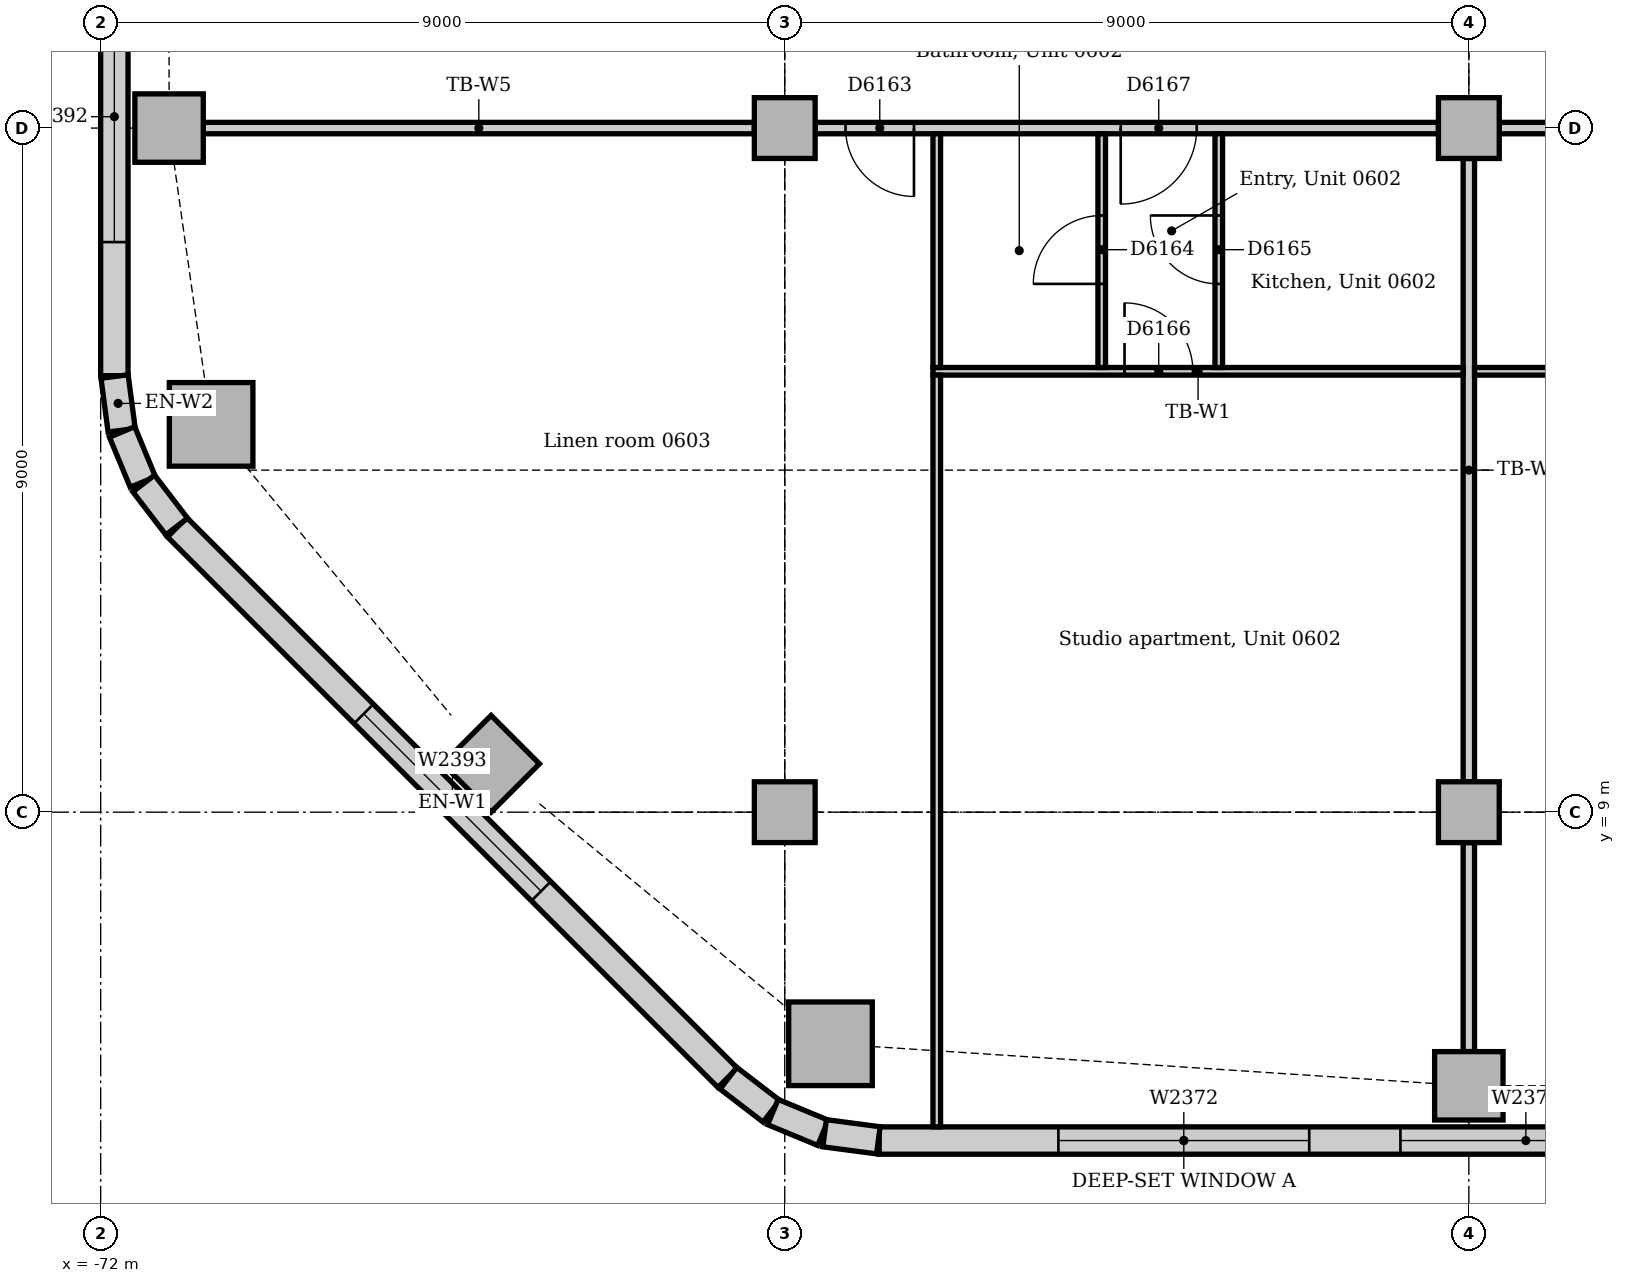
"""IFC4 building model, lengths in metres.
Left out: names, types, materials, properties, quantities, classifications, styles, units other than length and angle.
Written with IfcOpenShell. Run it as: python <this file> out.ifc"""

import sys

from ifc_helpers import new_model, si_unit, direction, frame, frame_2d, origin, origin_2d, place, context, subcontext, project, spatial, rectangle, extrude, element, fill, save


model = new_model("IFC4")
c1 = context("Model", 3, precision=1e-05, world=origin(), true_north=direction((0.0, 1.0)))
c2 = subcontext(c1, "Body", "Model", "MODEL_VIEW")
j1 = project(units=[si_unit("LENGTHUNIT", "METRE"), si_unit("PLANEANGLEUNIT", "RADIAN")], contexts=[c1])
p1 = place(None, origin())
s1 = spatial("IfcSite", under=j1, at=p1, CompositionType="ELEMENT")
p2 = place(p1, origin())
s2 = spatial("IfcBuilding", under=s1, at=p2, CompositionType="ELEMENT")
p3 = place(p2, frame((0.0, 0.0, 30.0)))
s3 = spatial("IfcBuildingStorey", under=s2, at=p3, CompositionType="ELEMENT", Elevation=30.0)
for number, where, z_axis, x_axis in (
    (1, (-62.398, 5.953, 0.0), (0.0, 0.0, 1.0), (1.0, 0.0, 0.0)),
    (2, (-70.547, 14.102, 0.0), (0.0, 0.0, 1.0), (1.0, 0.0, 0.0)),
):
    element("IfcColumn", number, at=place(p3, frame(where, z_axis=z_axis, x_axis=x_axis)), inside=s3, PredefinedType="COLUMN", context=c2, shape_type="SweptSolid", body=[
        extrude(rectangle(XDim=1.1, YDim=1.1, at=origin_2d()), origin(), (0.0, 0.0, 1.0), 3.85),
    ])
for number, where, z_axis, x_axis in (
    (3, (-54.0, 5.4, 0.0), (0.0, 0.0, 1.0), (1.0, 0.0, 0.0)),
    (4, (-71.1, 18.0, 0.0), (0.0, 0.0, 1.0), (1.0, 0.0, 0.0)),
    (5, (-66.864, 9.636, 0.0), (0.0, 0.0, 1.0), (0.707, 0.707, 0.0)),
):
    element("IfcColumn", number, at=place(p3, frame(where, z_axis=z_axis, x_axis=x_axis)), inside=s3, PredefinedType="COLUMN", context=c2, shape_type="SweptSolid", body=[
        extrude(rectangle(XDim=0.9, YDim=0.9, at=origin_2d()), origin(), (0.0, 0.0, 1.0), 3.85),
    ])
for number, where, z_axis, x_axis in (
    (6, (-63.0, 9.0, 0.0), (0.0, 0.0, 1.0), (1.0, 0.0, 0.0)),
    (7, (-63.0, 18.0, 0.0), (0.0, 0.0, 1.0), (1.0, 0.0, 0.0)),
    (8, (-54.0, 9.0, 0.0), (0.0, 0.0, 1.0), (1.0, 0.0, 0.0)),
    (9, (-54.0, 18.0, 0.0), (0.0, 0.0, 1.0), (1.0, 0.0, 0.0)),
):
    element("IfcColumn", number, at=place(p3, frame(where, z_axis=z_axis, x_axis=x_axis)), inside=s3, PredefinedType="COLUMN", context=c2, shape_type="SweptSolid", body=[
        extrude(rectangle(XDim=0.8, YDim=0.8, at=origin_2d()), origin(), (0.0, 0.0, 1.0), 3.85),
    ])
p4 = place(p3, frame((-61.757, 4.68, 0.0), z_axis=(0.0, 0.0, 1.0), x_axis=(1.0, 0.0, 0.0)))
e10 = element("IfcWall", 10, at=p4, inside=s3, PredefinedType="STANDARD", context=c2, shape_type="SweptSolid", body=[
    extrude(rectangle(XDim=30.515, YDim=0.36, at=frame_2d((15.257, 0.0))), origin(), (0.0, 0.0, 1.0), 3.85),
])
p5 = place(p4, frame((2.357, 0.0, 0.9)))
e11 = element("IfcOpeningElement", 11, at=p5, cuts=e10, PredefinedType="OPENING", context=c2, shape_type="SweptSolid", body=[
    extrude(rectangle(XDim=3.3, YDim=1.6, at=frame_2d((1.65, 0.8))), frame((0.0, 0.19, 0.0), z_axis=(0.0, -1.0, 0.0), x_axis=(1.0, 0.0, 0.0)), (0.0, 0.0, 1.0), 0.38),
])
p6 = place(p4, frame((6.857, 0.0, 0.9)))
e12 = element("IfcOpeningElement", 12, at=p6, cuts=e10, PredefinedType="OPENING", context=c2, shape_type="SweptSolid", body=[
    extrude(rectangle(XDim=3.3, YDim=1.6, at=frame_2d((1.65, 0.8))), frame((0.0, 0.19, 0.0), z_axis=(0.0, -1.0, 0.0), x_axis=(1.0, 0.0, 0.0)), (0.0, 0.0, 1.0), 0.38),
])
p7 = place(p4, frame((11.357, 0.0, 0.9)))
e13 = element("IfcOpeningElement", 13, at=p7, cuts=e10, PredefinedType="OPENING", context=c2, shape_type="SweptSolid", body=[
    extrude(rectangle(XDim=3.3, YDim=1.6, at=frame_2d((1.65, 0.8))), frame((0.0, 0.19, 0.0), z_axis=(0.0, -1.0, 0.0), x_axis=(1.0, 0.0, 0.0)), (0.0, 0.0, 1.0), 0.38),
])
p8 = place(p4, frame((15.857, 0.0, 0.9)))
e14 = element("IfcOpeningElement", 14, at=p8, cuts=e10, PredefinedType="OPENING", context=c2, shape_type="SweptSolid", body=[
    extrude(rectangle(XDim=3.3, YDim=1.6, at=frame_2d((1.65, 0.8))), frame((0.0, 0.19, 0.0), z_axis=(0.0, -1.0, 0.0), x_axis=(1.0, 0.0, 0.0)), (0.0, 0.0, 1.0), 0.38),
])
p9 = place(p4, frame((20.357, 0.0, 0.9)))
e15 = element("IfcOpeningElement", 15, at=p9, cuts=e10, PredefinedType="OPENING", context=c2, shape_type="SweptSolid", body=[
    extrude(rectangle(XDim=3.3, YDim=1.6, at=frame_2d((1.65, 0.8))), frame((0.0, 0.19, 0.0), z_axis=(0.0, -1.0, 0.0), x_axis=(1.0, 0.0, 0.0)), (0.0, 0.0, 1.0), 0.38),
])
p10 = place(p4, frame((24.857, 0.0, 0.9)))
e16 = element("IfcOpeningElement", 16, at=p10, cuts=e10, PredefinedType="OPENING", context=c2, shape_type="SweptSolid", body=[
    extrude(rectangle(XDim=3.3, YDim=1.6, at=frame_2d((1.65, 0.8))), frame((0.0, 0.19, 0.0), z_axis=(0.0, -1.0, 0.0), x_axis=(1.0, 0.0, 0.0)), (0.0, 0.0, 1.0), 0.38),
])
p11 = place(p3, frame((-71.82, 40.757, 0.0), z_axis=(0.0, 0.0, 1.0), x_axis=(0.0, -1.0, 0.0)))
e17 = element("IfcWall", 17, at=p11, inside=s3, PredefinedType="STANDARD", context=c2, shape_type="SweptSolid", body=[
    extrude(rectangle(XDim=26.015, YDim=0.36, at=frame_2d((13.007, 0.0))), origin(), (0.0, 0.0, 1.0), 3.85),
])
p12 = place(p11, frame((2.357, 0.0, 0.9)))
e18 = element("IfcOpeningElement", 18, at=p12, cuts=e17, PredefinedType="OPENING", context=c2, shape_type="SweptSolid", body=[
    extrude(rectangle(XDim=3.3, YDim=1.6, at=frame_2d((1.65, 0.8))), frame((0.0, 0.19, 0.0), z_axis=(0.0, -1.0, 0.0), x_axis=(1.0, 0.0, 0.0)), (0.0, 0.0, 1.0), 0.38),
])
p13 = place(p11, frame((7.057, 0.0, 0.9)))
e19 = element("IfcOpeningElement", 19, at=p13, cuts=e17, PredefinedType="OPENING", context=c2, shape_type="SweptSolid", body=[
    extrude(rectangle(XDim=3.3, YDim=1.6, at=frame_2d((1.65, 0.8))), frame((0.0, 0.19, 0.0), z_axis=(0.0, -1.0, 0.0), x_axis=(1.0, 0.0, 0.0)), (0.0, 0.0, 1.0), 0.38),
])
p14 = place(p11, frame((11.357, 0.0, 0.9)))
e20 = element("IfcOpeningElement", 20, at=p14, cuts=e17, PredefinedType="OPENING", context=c2, shape_type="SweptSolid", body=[
    extrude(rectangle(XDim=3.3, YDim=1.6, at=frame_2d((1.65, 0.8))), frame((0.0, 0.19, 0.0), z_axis=(0.0, -1.0, 0.0), x_axis=(1.0, 0.0, 0.0)), (0.0, 0.0, 1.0), 0.38),
])
p15 = place(p11, frame((15.857, 0.0, 0.9)))
e21 = element("IfcOpeningElement", 21, at=p15, cuts=e17, PredefinedType="OPENING", context=c2, shape_type="SweptSolid", body=[
    extrude(rectangle(XDim=3.3, YDim=1.6, at=frame_2d((1.65, 0.8))), frame((0.0, 0.19, 0.0), z_axis=(0.0, -1.0, 0.0), x_axis=(1.0, 0.0, 0.0)), (0.0, 0.0, 1.0), 0.38),
])
p16 = place(p11, frame((20.957, 0.0, 0.9)))
e22 = element("IfcOpeningElement", 22, at=p16, cuts=e17, PredefinedType="OPENING", context=c2, shape_type="SweptSolid", body=[
    extrude(rectangle(XDim=3.3, YDim=1.6, at=frame_2d((1.65, 0.8))), frame((0.0, 0.19, 0.0), z_axis=(0.0, -1.0, 0.0), x_axis=(1.0, 0.0, 0.0)), (0.0, 0.0, 1.0), 0.38),
])
p17 = place(p3, frame((-70.994, 12.749, 0.0), z_axis=(0.0, 0.0, 1.0), x_axis=(0.707106781187, -0.707106781187, 0.0)))
e23 = element("IfcWall", 23, at=p17, inside=s3, PredefinedType="STANDARD", context=c2, shape_type="SweptSolid", body=[
    extrude(rectangle(XDim=10.243, YDim=0.36, at=frame_2d((5.121, 0.0))), origin(), (0.0, 0.0, 1.0), 3.85),
])
p18 = place(p17, frame((3.471, 0.0, 0.9)))
e24 = element("IfcOpeningElement", 24, at=p18, cuts=e23, PredefinedType="OPENING", context=c2, shape_type="SweptSolid", body=[
    extrude(rectangle(XDim=3.3, YDim=1.6, at=frame_2d((1.65, 0.8))), frame((0.0, 0.19, 0.0), z_axis=(0.0, -1.0, 0.0), x_axis=(1.0, 0.0, 0.0)), (0.0, 0.0, 1.0), 0.38),
])
for number, where, z_axis, x_axis in (
    (25, (-71.817, 14.731, 0.0), (0.0, 0.0, 1.0), (0.131, -0.991, 0.0)),
    (26, (-71.718, 14.003, 0.0), (0.0, 0.0, 1.0), (0.383, -0.924, 0.0)),
):
    element("IfcWall", number, at=place(p3, frame(where, z_axis=z_axis, x_axis=x_axis)), inside=s3, PredefinedType="STANDARD", context=c2, shape_type="SweptSolid", body=[
        extrude(rectangle(XDim=0.713, YDim=0.36, at=frame_2d((0.356, 0.0))), origin(), (0.0, 0.0, 1.0), 3.85),
    ])
for number, where, z_axis, x_axis in (
    (27, (-71.434, 13.325, 0.0), (0.0, 0.0, 1.0), (0.609, -0.793, 0.0)),
    (28, (-63.741, 5.5, 0.0), (0.0, 0.0, 1.0), (0.793, -0.609, 0.0)),
):
    element("IfcWall", number, at=place(p3, frame(where, z_axis=z_axis, x_axis=x_axis)), inside=s3, PredefinedType="STANDARD", context=c2, shape_type="SweptSolid", body=[
        extrude(rectangle(XDim=0.713, YDim=0.36, at=frame_2d((0.357, 0.0))), origin(), (0.0, 0.0, 1.0), 3.85),
    ])
for number, where, z_axis, x_axis in (
    (29, (-63.156, 5.055, 0.0), (0.0, 0.0, 1.0), (0.924, -0.383, 0.0)),
    (30, (-62.476, 4.776, 0.0), (0.0, 0.0, 1.0), (0.991, -0.131, 0.0)),
):
    element("IfcWall", number, at=place(p3, frame(where, z_axis=z_axis, x_axis=x_axis)), inside=s3, PredefinedType="STANDARD", context=c2, shape_type="SweptSolid", body=[
        extrude(rectangle(XDim=0.713, YDim=0.36, at=frame_2d((0.356, 0.0))), origin(), (0.0, 0.0, 1.0), 3.85),
    ])
p19 = place(p3, frame((-53.6, 18.0, 0.0), z_axis=(0.0, 0.0, 1.0), x_axis=(1.0, 0.0, 0.0)))
e31 = element("IfcWall", 31, at=p19, inside=s3, PredefinedType="PARTITIONING", context=c2, shape_type="SweptSolid", body=[
    extrude(rectangle(XDim=8.2, YDim=0.15, at=frame_2d((4.1, 0.0))), origin(), (0.0, 0.0, 1.0), 3.15),
])
p20 = place(p19, frame((2.89, 0.0, 0.0)))
e32 = element("IfcOpeningElement", 32, at=p20, cuts=e31, PredefinedType="OPENING", context=c2, shape_type="SweptSolid", body=[
    extrude(rectangle(XDim=1.0, YDim=2.1, at=frame_2d((0.5, 1.05))), frame((0.0, 0.085, 0.0), z_axis=(0.0, -1.0, 0.0), x_axis=(1.0, 0.0, 0.0)), (0.0, 0.0, 1.0), 0.17),
])
p21 = place(p3, frame((-62.6, 18.0, 0.0), z_axis=(0.0, 0.0, 1.0), x_axis=(1.0, 0.0, 0.0)))
e33 = element("IfcWall", 33, at=p21, inside=s3, PredefinedType="PARTITIONING", context=c2, shape_type="SweptSolid", body=[
    extrude(rectangle(XDim=8.2, YDim=0.15, at=frame_2d((4.1, 0.0))), origin(), (0.0, 0.0, 1.0), 3.15),
])
p22 = place(p21, frame((0.4, 0.0, 0.0)))
e34 = element("IfcOpeningElement", 34, at=p22, cuts=e33, PredefinedType="OPENING", context=c2, shape_type="SweptSolid", body=[
    extrude(rectangle(XDim=0.9, YDim=2.1, at=frame_2d((0.45, 1.05))), frame((0.0, 0.085, 0.0), z_axis=(0.0, -1.0, 0.0), x_axis=(1.0, 0.0, 0.0)), (0.0, 0.0, 1.0), 0.17),
])
p23 = place(p21, frame((4.02, 0.0, 0.0)))
e35 = element("IfcOpeningElement", 35, at=p23, cuts=e33, PredefinedType="OPENING", context=c2, shape_type="SweptSolid", body=[
    extrude(rectangle(XDim=1.0, YDim=2.1, at=frame_2d((0.5, 1.05))), frame((0.0, 0.085, 0.0), z_axis=(0.0, -1.0, 0.0), x_axis=(1.0, 0.0, 0.0)), (0.0, 0.0, 1.0), 0.17),
])
p24 = place(p3, frame((-70.65, 18.0, 0.0), z_axis=(0.0, 0.0, 1.0), x_axis=(1.0, 0.0, 0.0)))
e36 = element("IfcWall", 36, at=p24, inside=s3, PredefinedType="PARTITIONING", context=c2, shape_type="SweptSolid", body=[
    extrude(rectangle(XDim=7.25, YDim=0.15, at=frame_2d((3.625, 0.0))), origin(), (0.0, 0.0, 1.0), 3.15),
])
p25 = place(p3, frame((-54.0, 9.4, 0.0), z_axis=(0.0, 0.0, 1.0), x_axis=(0.0, 1.0, 0.0)))
e37 = element("IfcWall", 37, at=p25, inside=s3, PredefinedType="PARTITIONING", context=c2, shape_type="SweptSolid", body=[
    extrude(rectangle(XDim=8.2, YDim=0.15, at=frame_2d((4.1, 0.0))), origin(), (0.0, 0.0, 1.0), 3.158),
])
p26 = place(p3, frame((-54.0, 5.85, 0.0), z_axis=(0.0, 0.0, 1.0), x_axis=(0.0, 1.0, 0.0)))
e38 = element("IfcWall", 38, at=p26, inside=s3, PredefinedType="PARTITIONING", context=c2, shape_type="SweptSolid", body=[
    extrude(rectangle(XDim=2.75, YDim=0.15, at=frame_2d((1.375, 0.0))), origin(), (0.0, 0.0, 1.0), 3.652),
])
p27 = place(p3, frame((-61.05, 14.8, 0.0), z_axis=(0.0, 0.0, 1.0), x_axis=(1.0, 0.0, 0.0)))
e39 = element("IfcWall", 39, at=p27, inside=s3, PredefinedType="PARTITIONING", context=c2, shape_type="SweptSolid", body=[
    extrude(rectangle(XDim=6.975, YDim=0.1, at=frame_2d((3.487, 0.0))), origin(), (0.0, 0.0, 1.0), 3.85),
])
p28 = place(p27, frame((2.52, 0.0, 0.0)))
e40 = element("IfcOpeningElement", 40, at=p28, cuts=e39, PredefinedType="OPENING", context=c2, shape_type="SweptSolid", body=[
    extrude(rectangle(XDim=0.9, YDim=2.1, at=frame_2d((0.45, 1.05))), frame((0.0, 0.06, 0.0), z_axis=(0.0, -1.0, 0.0), x_axis=(1.0, 0.0, 0.0)), (0.0, 0.0, 1.0), 0.12),
])
p29 = place(p3, frame((-53.925, 14.8, 0.0), z_axis=(0.0, 0.0, 1.0), x_axis=(1.0, 0.0, 0.0)))
e41 = element("IfcWall", 41, at=p29, inside=s3, PredefinedType="PARTITIONING", context=c2, shape_type="SweptSolid", body=[
    extrude(rectangle(XDim=8.85, YDim=0.1, at=frame_2d((4.425, 0.0))), origin(), (0.0, 0.0, 1.0), 3.85),
])
p30 = place(p29, frame((3.265, 0.0, 0.0)))
e42 = element("IfcOpeningElement", 42, at=p30, cuts=e41, PredefinedType="OPENING", context=c2, shape_type="SweptSolid", body=[
    extrude(rectangle(XDim=0.9, YDim=2.1, at=frame_2d((0.45, 1.05))), frame((0.0, 0.06, 0.0), z_axis=(0.0, -1.0, 0.0), x_axis=(1.0, 0.0, 0.0)), (0.0, 0.0, 1.0), 0.12),
])
p31 = place(p3, frame((-61.0, 14.85, 0.0), z_axis=(0.0, 0.0, 1.0), x_axis=(0.0, 1.0, 0.0)))
e43 = element("IfcWall", 43, at=p31, inside=s3, PredefinedType="PARTITIONING", context=c2, shape_type="SweptSolid", body=[
    extrude(rectangle(XDim=3.075, YDim=0.1, at=frame_2d((1.538, 0.0))), origin(), (0.0, 0.0, 1.0), 3.85),
])
p32 = place(p3, frame((-61.0, 4.86, 0.0), z_axis=(0.0, 0.0, 1.0), x_axis=(0.0, 1.0, 0.0)))
e44 = element("IfcWall", 44, at=p32, inside=s3, PredefinedType="PARTITIONING", context=c2, shape_type="SweptSolid", body=[
    extrude(rectangle(XDim=9.89, YDim=0.1, at=frame_2d((4.945, 0.0))), origin(), (0.0, 0.0, 1.0), 3.85),
])
p33 = place(p3, frame((-58.83, 14.85, 0.0), z_axis=(0.0, 0.0, 1.0), x_axis=(0.0, 1.0, 0.0)))
e45 = element("IfcWall", 45, at=p33, inside=s3, PredefinedType="PARTITIONING", context=c2, shape_type="SweptSolid", body=[
    extrude(rectangle(XDim=3.075, YDim=0.1, at=frame_2d((1.538, 0.0))), origin(), (0.0, 0.0, 1.0), 3.85),
])
p34 = place(p33, frame((1.1, 0.0, 0.0)))
e46 = element("IfcOpeningElement", 46, at=p34, cuts=e45, PredefinedType="OPENING", context=c2, shape_type="SweptSolid", body=[
    extrude(rectangle(XDim=0.9, YDim=2.1, at=frame_2d((0.45, 1.05))), frame((0.0, 0.06, 0.0), z_axis=(0.0, -1.0, 0.0), x_axis=(1.0, 0.0, 0.0)), (0.0, 0.0, 1.0), 0.12),
])
p35 = place(p3, frame((-57.29, 14.85, 0.0), z_axis=(0.0, 0.0, 1.0), x_axis=(0.0, 1.0, 0.0)))
e47 = element("IfcWall", 47, at=p35, inside=s3, PredefinedType="PARTITIONING", context=c2, shape_type="SweptSolid", body=[
    extrude(rectangle(XDim=3.075, YDim=0.1, at=frame_2d((1.538, 0.0))), origin(), (0.0, 0.0, 1.0), 3.85),
])
p36 = place(p35, frame((1.1, 0.0, 0.0)))
e48 = element("IfcOpeningElement", 48, at=p36, cuts=e47, PredefinedType="OPENING", context=c2, shape_type="SweptSolid", body=[
    extrude(rectangle(XDim=0.9, YDim=2.1, at=frame_2d((0.45, 1.05))), frame((0.0, 0.06, 0.0), z_axis=(0.0, -1.0, 0.0), x_axis=(1.0, 0.0, 0.0)), (0.0, 0.0, 1.0), 0.12),
])
p37 = place(p5, origin())
e49 = element("IfcWindow", 49, at=p37, inside=s3, PartitioningType="SINGLE_PANEL", PredefinedType="WINDOW", context=c2, shape_type="SweptSolid", body=[
    extrude(rectangle(XDim=3.3, YDim=1.6, at=frame_2d((1.65, 0.8))), frame((0.0, 0.13, 0.0), z_axis=(0.0, -1.0, 0.0), x_axis=(1.0, 0.0, 0.0)), (0.0, 0.0, 1.0), 0.06),
])
fill(e11, e49)
p38 = place(p6, origin())
e50 = element("IfcWindow", 50, at=p38, inside=s3, PartitioningType="SINGLE_PANEL", PredefinedType="WINDOW", context=c2, shape_type="SweptSolid", body=[
    extrude(rectangle(XDim=3.3, YDim=1.6, at=frame_2d((1.65, 0.8))), frame((0.0, 0.13, 0.0), z_axis=(0.0, -1.0, 0.0), x_axis=(1.0, 0.0, 0.0)), (0.0, 0.0, 1.0), 0.06),
])
fill(e12, e50)
p39 = place(p16, origin())
e51 = element("IfcWindow", 51, at=p39, inside=s3, PartitioningType="SINGLE_PANEL", PredefinedType="WINDOW", context=c2, shape_type="SweptSolid", body=[
    extrude(rectangle(XDim=3.3, YDim=1.6, at=frame_2d((1.65, 0.8))), frame((0.0, 0.13, 0.0), z_axis=(0.0, -1.0, 0.0), x_axis=(1.0, 0.0, 0.0)), (0.0, 0.0, 1.0), 0.06),
])
fill(e22, e51)
p40 = place(p18, origin())
e52 = element("IfcWindow", 52, at=p40, inside=s3, PartitioningType="SINGLE_PANEL", PredefinedType="WINDOW", context=c2, shape_type="SweptSolid", body=[
    extrude(rectangle(XDim=3.3, YDim=1.6, at=frame_2d((1.65, 0.8))), frame((0.0, 0.13, 0.0), z_axis=(0.0, -1.0, 0.0), x_axis=(1.0, 0.0, 0.0)), (0.0, 0.0, 1.0), 0.06),
])
fill(e24, e52)
p41 = place(p22, frame((0.9, 0.0, 0.0), z_axis=(0.0, 0.0, 1.0), x_axis=(-1.0, 0.0, 0.0)))
e53 = element("IfcDoor", 53, at=p41, inside=s3, OperationType="SINGLE_SWING_LEFT", PredefinedType="DOOR", context=c2, shape_type="SweptSolid", body=[
    extrude(rectangle(XDim=0.9, YDim=2.1, at=frame_2d((0.45, 1.05))), frame((0.0, 0.025, 0.0), z_axis=(0.0, -1.0, 0.0), x_axis=(1.0, 0.0, 0.0)), (0.0, 0.0, 1.0), 0.05),
])
fill(e34, e53)
p42 = place(p34, origin())
e54 = element("IfcDoor", 54, at=p42, inside=s3, OperationType="SINGLE_SWING_LEFT", PredefinedType="DOOR", context=c2, shape_type="SweptSolid", body=[
    extrude(rectangle(XDim=0.9, YDim=2.1, at=frame_2d((0.45, 1.05))), frame((0.0, 0.025, 0.0), z_axis=(0.0, -1.0, 0.0), x_axis=(1.0, 0.0, 0.0)), (0.0, 0.0, 1.0), 0.05),
])
fill(e46, e54)
p43 = place(p36, origin())
e55 = element("IfcDoor", 55, at=p43, inside=s3, OperationType="SINGLE_SWING_RIGHT", PredefinedType="DOOR", context=c2, shape_type="SweptSolid", body=[
    extrude(rectangle(XDim=0.9, YDim=2.1, at=frame_2d((0.45, 1.05))), frame((0.0, 0.025, 0.0), z_axis=(0.0, -1.0, 0.0), x_axis=(1.0, 0.0, 0.0)), (0.0, 0.0, 1.0), 0.05),
])
fill(e48, e55)
p44 = place(p28, origin())
e56 = element("IfcDoor", 56, at=p44, inside=s3, OperationType="SINGLE_SWING_LEFT", PredefinedType="DOOR", context=c2, shape_type="SweptSolid", body=[
    extrude(rectangle(XDim=0.9, YDim=2.1, at=frame_2d((0.45, 1.05))), frame((0.0, 0.025, 0.0), z_axis=(0.0, -1.0, 0.0), x_axis=(1.0, 0.0, 0.0)), (0.0, 0.0, 1.0), 0.05),
])
fill(e40, e56)
p45 = place(p23, frame((1.0, 0.0, 0.0), z_axis=(0.0, 0.0, 1.0), x_axis=(-1.0, 0.0, 0.0)))
e57 = element("IfcDoor", 57, at=p45, inside=s3, OperationType="SINGLE_SWING_RIGHT", PredefinedType="DOOR", context=c2, shape_type="SweptSolid", body=[
    extrude(rectangle(XDim=1.0, YDim=2.1, at=frame_2d((0.5, 1.05))), frame((0.0, 0.025, 0.0), z_axis=(0.0, -1.0, 0.0), x_axis=(1.0, 0.0, 0.0)), (0.0, 0.0, 1.0), 0.05),
])
fill(e35, e57)
save(model, sys.argv[1])
